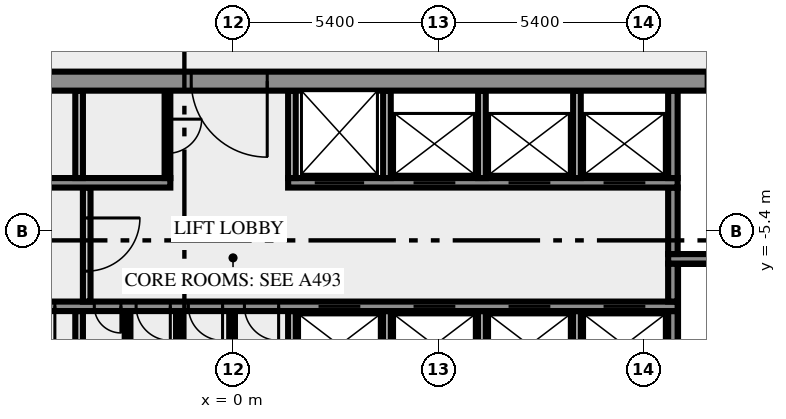
"""IFC4 building model, lengths in metres.
Left out: names, types, materials, properties, quantities, classifications, styles, units other than length and angle.
Written with IfcOpenShell. Run it as: python <this file> out.ifc"""

import sys

from ifc_helpers import new_model, si_unit, direction, frame, frame_2d, origin, place, context, subcontext, project, spatial, rectangle, extrude, element, fill, save


model = new_model("IFC4")
c1 = context("Model", 3, precision=1e-05, world=origin(), true_north=direction((0.0, 1.0)))
c2 = subcontext(c1, "Body", "Model", "MODEL_VIEW")
j1 = project(units=[si_unit("LENGTHUNIT", "METRE"), si_unit("PLANEANGLEUNIT", "RADIAN")], contexts=[c1])
p1 = place(None, origin())
s1 = spatial("IfcSite", under=j1, at=p1, CompositionType="ELEMENT")
p2 = place(p1, origin())
s2 = spatial("IfcBuilding", under=s1, at=p2, CompositionType="ELEMENT")
p3 = place(p2, frame((0.0, 0.0, 206.0)))
s3 = spatial("IfcBuildingStorey", under=s2, at=p3, CompositionType="ELEMENT", Elevation=206.0)
p4 = place(p3, frame((-4.05, -10.5, 0.0), z_axis=(0.0, 0.0, 1.0), x_axis=(0.0, 1.0, 0.0)))
e1 = element("IfcWall", 1, at=p4, inside=s3, PredefinedType="SOLIDWALL", context=c2, shape_type="SweptSolid", body=[
    extrude(rectangle(XDim=3.0, YDim=0.2, at=frame_2d((1.5, 0.0))), origin(), (0.0, 0.0, 1.0), 3.65),
])
for number, where, z_axis, x_axis in (
    (2, (-2.775, -10.5, 0.0), (0.0, 0.0, 1.0), (0.0, 1.0, 0.0)),
    (3, (-1.425, -10.5, 0.0), (0.0, 0.0, 1.0), (0.0, 1.0, 0.0)),
    (4, (-0.025, -10.5, 0.0), (0.0, 0.0, 1.0), (0.0, 1.0, 0.0)),
):
    element("IfcWall", number, at=place(p3, frame(where, z_axis=z_axis, x_axis=x_axis)), inside=s3, PredefinedType="PARTITIONING", context=c2, shape_type="SweptSolid", body=[
        extrude(rectangle(XDim=3.0, YDim=0.15, at=frame_2d((1.5, 0.0))), origin(), (0.0, 0.0, 1.0), 3.65),
    ])
for number, where, z_axis, x_axis in (
    (5, (1.55, -10.5, 0.0), (0.0, 0.0, 1.0), (0.0, 1.0, 0.0)),
    (6, (4.05, -10.5, 0.0), (0.0, 0.0, 1.0), (0.0, 1.0, 0.0)),
    (7, (6.55, -10.5, 0.0), (0.0, 0.0, 1.0), (0.0, 1.0, 0.0)),
    (8, (9.05, -10.5, 0.0), (0.0, 0.0, 1.0), (0.0, 1.0, 0.0)),
):
    element("IfcWall", number, at=place(p3, frame(where, z_axis=z_axis, x_axis=x_axis)), inside=s3, PredefinedType="SOLIDWALL", context=c2, shape_type="SweptSolid", body=[
        extrude(rectangle(XDim=3.0, YDim=0.2, at=frame_2d((1.5, 0.0))), origin(), (0.0, 0.0, 1.0), 3.65),
    ])
p5 = place(p3, frame((11.575, -10.5, 0.0), z_axis=(0.0, 0.0, 1.0), x_axis=(0.0, 1.0, 0.0)))
e9 = element("IfcWall", 9, at=p5, inside=s3, PredefinedType="SHEAR", context=c2, shape_type="SweptSolid", body=[
    extrude(rectangle(XDim=3.0, YDim=0.25, at=frame_2d((1.5, 0.0))), origin(), (0.0, 0.0, 1.0), 3.65),
])
p6 = place(p3, frame((11.7, -7.375, 0.0), z_axis=(0.0, 0.0, 1.0), x_axis=(-1.0, 0.0, 0.0)))
e10 = element("IfcWall", 10, at=p6, inside=s3, PredefinedType="SHEAR", context=c2, shape_type="SweptSolid", body=[
    extrude(rectangle(XDim=23.4, YDim=0.25, at=frame_2d((11.7, 0.0))), origin(), (0.0, 0.0, 1.0), 3.65),
])
p7 = place(p6, frame((21.312, 0.0, 0.0)))
e11 = element("IfcOpeningElement", 11, at=p7, cuts=e10, PredefinedType="OPENING", context=c2, shape_type="SweptSolid", body=[
    extrude(rectangle(XDim=0.9, YDim=2.1, at=frame_2d((0.45, 1.05))), frame((0.0, 0.135, 0.0), z_axis=(0.0, -1.0, 0.0), x_axis=(1.0, 0.0, 0.0)), (0.0, 0.0, 1.0), 0.27),
])
p8 = place(p6, frame((18.65, 0.0, 0.0)))
e12 = element("IfcOpeningElement", 12, at=p8, cuts=e10, PredefinedType="OPENING", context=c2, shape_type="SweptSolid", body=[
    extrude(rectangle(XDim=0.9, YDim=2.1, at=frame_2d((0.45, 1.05))), frame((0.0, 0.135, 0.0), z_axis=(0.0, -1.0, 0.0), x_axis=(1.0, 0.0, 0.0)), (0.0, 0.0, 1.0), 0.27),
])
p9 = place(p6, frame((16.388, 0.0, 0.0)))
e13 = element("IfcOpeningElement", 13, at=p9, cuts=e10, PredefinedType="OPENING", context=c2, shape_type="SweptSolid", body=[
    extrude(rectangle(XDim=0.9, YDim=2.1, at=frame_2d((0.45, 1.05))), frame((0.0, 0.135, 0.0), z_axis=(0.0, -1.0, 0.0), x_axis=(1.0, 0.0, 0.0)), (0.0, 0.0, 1.0), 0.27),
])
p10 = place(p6, frame((14.65, 0.0, 0.0)))
e14 = element("IfcOpeningElement", 14, at=p10, cuts=e10, PredefinedType="OPENING", context=c2, shape_type="SweptSolid", body=[
    extrude(rectangle(XDim=0.7, YDim=2.1, at=frame_2d((0.35, 1.05))), frame((0.0, 0.135, 0.0), z_axis=(0.0, -1.0, 0.0), x_axis=(1.0, 0.0, 0.0)), (0.0, 0.0, 1.0), 0.27),
])
p11 = place(p6, frame((13.35, 0.0, 0.0)))
e15 = element("IfcOpeningElement", 15, at=p11, cuts=e10, PredefinedType="OPENING", context=c2, shape_type="SweptSolid", body=[
    extrude(rectangle(XDim=0.9, YDim=2.1, at=frame_2d((0.45, 1.05))), frame((0.0, 0.135, 0.0), z_axis=(0.0, -1.0, 0.0), x_axis=(1.0, 0.0, 0.0)), (0.0, 0.0, 1.0), 0.27),
])
p12 = place(p6, frame((11.975, 0.0, 0.0)))
e16 = element("IfcOpeningElement", 16, at=p12, cuts=e10, PredefinedType="OPENING", context=c2, shape_type="SweptSolid", body=[
    extrude(rectangle(XDim=0.9, YDim=2.1, at=frame_2d((0.45, 1.05))), frame((0.0, 0.135, 0.0), z_axis=(0.0, -1.0, 0.0), x_axis=(1.0, 0.0, 0.0)), (0.0, 0.0, 1.0), 0.27),
])
p13 = place(p6, frame((10.5, 0.0, 0.0)))
e17 = element("IfcOpeningElement", 17, at=p13, cuts=e10, PredefinedType="OPENING", context=c2, shape_type="SweptSolid", body=[
    extrude(rectangle(XDim=0.9, YDim=2.1, at=frame_2d((0.45, 1.05))), frame((0.0, 0.135, 0.0), z_axis=(0.0, -1.0, 0.0), x_axis=(1.0, 0.0, 0.0)), (0.0, 0.0, 1.0), 0.27),
])
p14 = place(p6, frame((8.35, 0.0, 0.0)))
e18 = element("IfcOpeningElement", 18, at=p14, cuts=e10, PredefinedType="OPENING", context=c2, shape_type="SweptSolid", body=[
    extrude(rectangle(XDim=1.1, YDim=2.1, at=frame_2d((0.55, 1.05))), frame((0.0, 0.135, 0.0), z_axis=(0.0, -1.0, 0.0), x_axis=(1.0, 0.0, 0.0)), (0.0, 0.0, 1.0), 0.27),
])
p15 = place(p6, frame((5.85, 0.0, 0.0)))
e19 = element("IfcOpeningElement", 19, at=p15, cuts=e10, PredefinedType="OPENING", context=c2, shape_type="SweptSolid", body=[
    extrude(rectangle(XDim=1.1, YDim=2.1, at=frame_2d((0.55, 1.05))), frame((0.0, 0.135, 0.0), z_axis=(0.0, -1.0, 0.0), x_axis=(1.0, 0.0, 0.0)), (0.0, 0.0, 1.0), 0.27),
])
p16 = place(p6, frame((3.35, 0.0, 0.0)))
e20 = element("IfcOpeningElement", 20, at=p16, cuts=e10, PredefinedType="OPENING", context=c2, shape_type="SweptSolid", body=[
    extrude(rectangle(XDim=1.1, YDim=2.1, at=frame_2d((0.55, 1.05))), frame((0.0, 0.135, 0.0), z_axis=(0.0, -1.0, 0.0), x_axis=(1.0, 0.0, 0.0)), (0.0, 0.0, 1.0), 0.27),
])
p17 = place(p6, frame((0.85, 0.0, 0.0)))
e21 = element("IfcOpeningElement", 21, at=p17, cuts=e10, PredefinedType="OPENING", context=c2, shape_type="SweptSolid", body=[
    extrude(rectangle(XDim=1.1, YDim=2.1, at=frame_2d((0.55, 1.05))), frame((0.0, 0.135, 0.0), z_axis=(0.0, -1.0, 0.0), x_axis=(1.0, 0.0, 0.0)), (0.0, 0.0, 1.0), 0.27),
])
p18 = place(p3, frame((-3.85, -4.25, 0.0), z_axis=(0.0, 0.0, 1.0), x_axis=(0.0, -1.0, 0.0)))
e22 = element("IfcWall", 22, at=p18, inside=s3, PredefinedType="SOLIDWALL", context=c2, shape_type="SweptSolid", body=[
    extrude(rectangle(XDim=3.0, YDim=0.2, at=frame_2d((1.5, 0.0))), origin(), (0.0, 0.0, 1.0), 3.65),
])
p19 = place(p18, frame((0.8, 0.0, 0.0)))
e23 = element("IfcOpeningElement", 23, at=p19, cuts=e22, PredefinedType="OPENING", context=c2, shape_type="SweptSolid", body=[
    extrude(rectangle(XDim=1.4, YDim=2.1, at=frame_2d((0.7, 1.05))), frame((0.0, 0.11, 0.0), z_axis=(0.0, -1.0, 0.0), x_axis=(1.0, 0.0, 0.0)), (0.0, 0.0, 1.0), 0.22),
])
p20 = place(p3, frame((11.575, -7.25, 0.0), z_axis=(0.0, 0.0, 1.0), x_axis=(0.0, 1.0, 0.0)))
e24 = element("IfcWall", 24, at=p20, inside=s3, PredefinedType="SHEAR", context=c2, shape_type="SweptSolid", body=[
    extrude(rectangle(XDim=1.0, YDim=0.25, at=frame_2d((0.5, 0.0))), origin(), (0.0, 0.0, 1.0), 3.65),
])
p21 = place(p3, frame((19.5, -6.125, 0.0), z_axis=(0.0, 0.0, 1.0), x_axis=(-1.0, 0.0, 0.0)))
e25 = element("IfcWall", 25, at=p21, inside=s3, PredefinedType="SHEAR", context=c2, shape_type="SweptSolid", body=[
    extrude(rectangle(XDim=8.05, YDim=0.25, at=frame_2d((4.025, 0.0))), origin(), (0.0, 0.0, 1.0), 3.65),
])
p22 = place(p21, frame((0.05, 0.0, 0.0)))
e26 = element("IfcOpeningElement", 26, at=p22, cuts=e25, PredefinedType="OPENING", context=c2, shape_type="SweptSolid", body=[
    extrude(rectangle(XDim=1.8, YDim=2.1, at=frame_2d((0.9, 1.05))), frame((0.0, 0.135, 0.0), z_axis=(0.0, -1.0, 0.0), x_axis=(1.0, 0.0, 0.0)), (0.0, 0.0, 1.0), 0.27),
])
p23 = place(p3, frame((11.575, -6.0, 0.0), z_axis=(0.0, 0.0, 1.0), x_axis=(0.0, 1.0, 0.0)))
e27 = element("IfcWall", 27, at=p23, inside=s3, PredefinedType="SHEAR", context=c2, shape_type="SweptSolid", body=[
    extrude(rectangle(XDim=1.75, YDim=0.25, at=frame_2d((0.875, 0.0))), origin(), (0.0, 0.0, 1.0), 3.65),
])
p24 = place(p3, frame((-11.7, -4.125, 0.0), z_axis=(0.0, 0.0, 1.0), x_axis=(1.0, 0.0, 0.0)))
e28 = element("IfcWall", 28, at=p24, inside=s3, PredefinedType="SHEAR", context=c2, shape_type="SweptSolid", body=[
    extrude(rectangle(XDim=10.05, YDim=0.25, at=frame_2d((5.025, 0.0))), origin(), (0.0, 0.0, 1.0), 3.65),
])
p25 = place(p3, frame((1.45, -4.125, 0.0), z_axis=(0.0, 0.0, 1.0), x_axis=(1.0, 0.0, 0.0)))
e29 = element("IfcWall", 29, at=p25, inside=s3, PredefinedType="SHEAR", context=c2, shape_type="SweptSolid", body=[
    extrude(rectangle(XDim=10.25, YDim=0.25, at=frame_2d((5.125, 0.0))), origin(), (0.0, 0.0, 1.0), 3.65),
])
p26 = place(p25, frame((0.7, 0.0, 0.0)))
e30 = element("IfcOpeningElement", 30, at=p26, cuts=e29, PredefinedType="OPENING", context=c2, shape_type="SweptSolid", body=[
    extrude(rectangle(XDim=1.3, YDim=2.1, at=frame_2d((0.65, 1.05))), frame((0.0, 0.135, 0.0), z_axis=(0.0, -1.0, 0.0), x_axis=(1.0, 0.0, 0.0)), (0.0, 0.0, 1.0), 0.27),
])
p27 = place(p25, frame((3.3, 0.0, 0.0)))
e31 = element("IfcOpeningElement", 31, at=p27, cuts=e29, PredefinedType="OPENING", context=c2, shape_type="SweptSolid", body=[
    extrude(rectangle(XDim=1.1, YDim=2.1, at=frame_2d((0.55, 1.05))), frame((0.0, 0.135, 0.0), z_axis=(0.0, -1.0, 0.0), x_axis=(1.0, 0.0, 0.0)), (0.0, 0.0, 1.0), 0.27),
])
p28 = place(p25, frame((5.8, 0.0, 0.0)))
e32 = element("IfcOpeningElement", 32, at=p28, cuts=e29, PredefinedType="OPENING", context=c2, shape_type="SweptSolid", body=[
    extrude(rectangle(XDim=1.1, YDim=2.1, at=frame_2d((0.55, 1.05))), frame((0.0, 0.135, 0.0), z_axis=(0.0, -1.0, 0.0), x_axis=(1.0, 0.0, 0.0)), (0.0, 0.0, 1.0), 0.27),
])
p29 = place(p25, frame((8.3, 0.0, 0.0)))
e33 = element("IfcOpeningElement", 33, at=p29, cuts=e29, PredefinedType="OPENING", context=c2, shape_type="SweptSolid", body=[
    extrude(rectangle(XDim=1.1, YDim=2.1, at=frame_2d((0.55, 1.05))), frame((0.0, 0.135, 0.0), z_axis=(0.0, -1.0, 0.0), x_axis=(1.0, 0.0, 0.0)), (0.0, 0.0, 1.0), 0.27),
])
p30 = place(p3, frame((-4.05, -4.0, 0.0), z_axis=(0.0, 0.0, 1.0), x_axis=(0.0, 1.0, 0.0)))
e34 = element("IfcWall", 34, at=p30, inside=s3, PredefinedType="SOLIDWALL", context=c2, shape_type="SweptSolid", body=[
    extrude(rectangle(XDim=2.3, YDim=0.2, at=frame_2d((1.15, 0.0))), origin(), (0.0, 0.0, 1.0), 3.65),
])
p31 = place(p3, frame((-1.725, -1.7, 0.0), z_axis=(0.0, 0.0, 1.0), x_axis=(0.0, -1.0, 0.0)))
e35 = element("IfcWall", 35, at=p31, inside=s3, PredefinedType="PARTITIONING", context=c2, shape_type="SweptSolid", body=[
    extrude(rectangle(XDim=2.3, YDim=0.15, at=frame_2d((1.15, 0.0))), origin(), (0.0, 0.0, 1.0), 3.65),
])
p32 = place(p31, frame((0.75, 0.0, 0.0)))
e36 = element("IfcOpeningElement", 36, at=p32, cuts=e35, PredefinedType="OPENING", context=c2, shape_type="SweptSolid", body=[
    extrude(rectangle(XDim=0.9, YDim=2.1, at=frame_2d((0.45, 1.05))), frame((0.0, 0.085, 0.0), z_axis=(0.0, -1.0, 0.0), x_axis=(1.0, 0.0, 0.0)), (0.0, 0.0, 1.0), 0.17),
])
for number, where, z_axis, x_axis in (
    (37, (1.55, -4.0, 0.0), (0.0, 0.0, 1.0), (0.0, 1.0, 0.0)),
    (38, (4.05, -4.0, 0.0), (0.0, 0.0, 1.0), (0.0, 1.0, 0.0)),
    (39, (6.55, -4.0, 0.0), (0.0, 0.0, 1.0), (0.0, 1.0, 0.0)),
    (40, (9.05, -4.0, 0.0), (0.0, 0.0, 1.0), (0.0, 1.0, 0.0)),
):
    element("IfcWall", number, at=place(p3, frame(where, z_axis=z_axis, x_axis=x_axis)), inside=s3, PredefinedType="SOLIDWALL", context=c2, shape_type="SweptSolid", body=[
        extrude(rectangle(XDim=2.3, YDim=0.2, at=frame_2d((1.15, 0.0))), origin(), (0.0, 0.0, 1.0), 3.65),
    ])
p33 = place(p3, frame((11.575, -4.0, 0.0), z_axis=(0.0, 0.0, 1.0), x_axis=(0.0, 1.0, 0.0)))
e41 = element("IfcWall", 41, at=p33, inside=s3, PredefinedType="SHEAR", context=c2, shape_type="SweptSolid", body=[
    extrude(rectangle(XDim=2.3, YDim=0.25, at=frame_2d((1.15, 0.0))), origin(), (0.0, 0.0, 1.0), 3.65),
])
p34 = place(p3, frame((20.49, -1.45, 0.0), z_axis=(0.0, 0.0, 1.0), x_axis=(-1.0, 0.0, 0.0)))
e42 = element("IfcWall", 42, at=p34, inside=s3, PredefinedType="SHEAR", context=c2, shape_type="SweptSolid", body=[
    extrude(rectangle(XDim=40.98, YDim=0.5, at=frame_2d((20.49, 0.0))), origin(), (0.0, 0.0, 1.0), 3.65),
])
p35 = place(p34, frame((38.14, 0.0, 0.0)))
e43 = element("IfcOpeningElement", 43, at=p35, cuts=e42, PredefinedType="OPENING", context=c2, shape_type="SweptSolid", body=[
    extrude(rectangle(XDim=1.8, YDim=2.1, at=frame_2d((0.9, 1.05))), frame((0.0, 0.26, 0.0), z_axis=(0.0, -1.0, 0.0), x_axis=(1.0, 0.0, 0.0)), (0.0, 0.0, 1.0), 0.52),
])
p36 = place(p34, frame((36.728, 0.0, 0.0)))
e44 = element("IfcOpeningElement", 44, at=p36, cuts=e42, PredefinedType="OPENING", context=c2, shape_type="SweptSolid", body=[
    extrude(rectangle(XDim=0.8, YDim=2.1, at=frame_2d((0.4, 1.05))), frame((0.0, 0.26, 0.0), z_axis=(0.0, -1.0, 0.0), x_axis=(1.0, 0.0, 0.0)), (0.0, 0.0, 1.0), 0.52),
])
p37 = place(p34, frame((35.153, 0.0, 0.0)))
e45 = element("IfcOpeningElement", 45, at=p37, cuts=e42, PredefinedType="OPENING", context=c2, shape_type="SweptSolid", body=[
    extrude(rectangle(XDim=0.8, YDim=2.1, at=frame_2d((0.4, 1.05))), frame((0.0, 0.26, 0.0), z_axis=(0.0, -1.0, 0.0), x_axis=(1.0, 0.0, 0.0)), (0.0, 0.0, 1.0), 0.52),
])
p38 = place(p34, frame((32.94, 0.0, 0.0)))
e46 = element("IfcOpeningElement", 46, at=p38, cuts=e42, PredefinedType="OPENING", context=c2, shape_type="SweptSolid", body=[
    extrude(rectangle(XDim=0.9, YDim=2.1, at=frame_2d((0.45, 1.05))), frame((0.0, 0.26, 0.0), z_axis=(0.0, -1.0, 0.0), x_axis=(1.0, 0.0, 0.0)), (0.0, 0.0, 1.0), 0.52),
])
p39 = place(p34, frame((30.702, 0.0, 0.0)))
e47 = element("IfcOpeningElement", 47, at=p39, cuts=e42, PredefinedType="OPENING", context=c2, shape_type="SweptSolid", body=[
    extrude(rectangle(XDim=0.9, YDim=2.1, at=frame_2d((0.45, 1.05))), frame((0.0, 0.26, 0.0), z_axis=(0.0, -1.0, 0.0), x_axis=(1.0, 0.0, 0.0)), (0.0, 0.0, 1.0), 0.52),
])
p40 = place(p34, frame((28.64, 0.0, 0.0)))
e48 = element("IfcOpeningElement", 48, at=p40, cuts=e42, PredefinedType="OPENING", context=c2, shape_type="SweptSolid", body=[
    extrude(rectangle(XDim=0.9, YDim=2.1, at=frame_2d((0.45, 1.05))), frame((0.0, 0.26, 0.0), z_axis=(0.0, -1.0, 0.0), x_axis=(1.0, 0.0, 0.0)), (0.0, 0.0, 1.0), 0.52),
])
p41 = place(p34, frame((25.778, 0.0, 0.0)))
e49 = element("IfcOpeningElement", 49, at=p41, cuts=e42, PredefinedType="OPENING", context=c2, shape_type="SweptSolid", body=[
    extrude(rectangle(XDim=0.9, YDim=2.1, at=frame_2d((0.45, 1.05))), frame((0.0, 0.26, 0.0), z_axis=(0.0, -1.0, 0.0), x_axis=(1.0, 0.0, 0.0)), (0.0, 0.0, 1.0), 0.52),
])
p42 = place(p34, frame((19.59, 0.0, 0.0)))
e50 = element("IfcOpeningElement", 50, at=p42, cuts=e42, PredefinedType="OPENING", context=c2, shape_type="SweptSolid", body=[
    extrude(rectangle(XDim=2.0, YDim=2.1, at=frame_2d((1.0, 1.05))), frame((0.0, 0.26, 0.0), z_axis=(0.0, -1.0, 0.0), x_axis=(1.0, 0.0, 0.0)), (0.0, 0.0, 1.0), 0.52),
])
p43 = place(p34, frame((7.14, 0.0, 0.0)))
e51 = element("IfcOpeningElement", 51, at=p43, cuts=e42, PredefinedType="OPENING", context=c2, shape_type="SweptSolid", body=[
    extrude(rectangle(XDim=0.9, YDim=2.1, at=frame_2d((0.45, 1.05))), frame((0.0, 0.26, 0.0), z_axis=(0.0, -1.0, 0.0), x_axis=(1.0, 0.0, 0.0)), (0.0, 0.0, 1.0), 0.52),
])
p44 = place(p34, frame((4.19, 0.0, 0.0)))
e52 = element("IfcOpeningElement", 52, at=p44, cuts=e42, PredefinedType="OPENING", context=c2, shape_type="SweptSolid", body=[
    extrude(rectangle(XDim=0.9, YDim=2.1, at=frame_2d((0.45, 1.05))), frame((0.0, 0.26, 0.0), z_axis=(0.0, -1.0, 0.0), x_axis=(1.0, 0.0, 0.0)), (0.0, 0.0, 1.0), 0.52),
])
p45 = place(p34, frame((1.04, 0.0, 0.0)))
e53 = element("IfcOpeningElement", 53, at=p45, cuts=e42, PredefinedType="OPENING", context=c2, shape_type="SweptSolid", body=[
    extrude(rectangle(XDim=1.8, YDim=2.1, at=frame_2d((0.9, 1.05))), frame((0.0, 0.26, 0.0), z_axis=(0.0, -1.0, 0.0), x_axis=(1.0, 0.0, 0.0)), (0.0, 0.0, 1.0), 0.52),
])
p46 = place(p9, origin())
e54 = element("IfcDoor", 54, at=p46, inside=s3, OperationType="SINGLE_SWING_RIGHT", PredefinedType="DOOR", context=c2, shape_type="SweptSolid", body=[
    extrude(rectangle(XDim=0.9, YDim=2.1, at=frame_2d((0.45, 1.05))), frame((0.0, 0.025, 0.0), z_axis=(0.0, -1.0, 0.0), x_axis=(1.0, 0.0, 0.0)), (0.0, 0.0, 1.0), 0.05),
])
fill(e13, e54)
p47 = place(p10, origin())
e55 = element("IfcDoor", 55, at=p47, inside=s3, OperationType="SINGLE_SWING_RIGHT", PredefinedType="DOOR", context=c2, shape_type="SweptSolid", body=[
    extrude(rectangle(XDim=0.7, YDim=2.1, at=frame_2d((0.35, 1.05))), frame((0.0, 0.025, 0.0), z_axis=(0.0, -1.0, 0.0), x_axis=(1.0, 0.0, 0.0)), (0.0, 0.0, 1.0), 0.05),
])
fill(e14, e55)
p48 = place(p11, origin())
e56 = element("IfcDoor", 56, at=p48, inside=s3, OperationType="SINGLE_SWING_RIGHT", PredefinedType="DOOR", context=c2, shape_type="SweptSolid", body=[
    extrude(rectangle(XDim=0.9, YDim=2.1, at=frame_2d((0.45, 1.05))), frame((0.0, 0.025, 0.0), z_axis=(0.0, -1.0, 0.0), x_axis=(1.0, 0.0, 0.0)), (0.0, 0.0, 1.0), 0.05),
])
fill(e15, e56)
p49 = place(p12, origin())
e57 = element("IfcDoor", 57, at=p49, inside=s3, OperationType="SINGLE_SWING_RIGHT", PredefinedType="DOOR", context=c2, shape_type="SweptSolid", body=[
    extrude(rectangle(XDim=0.9, YDim=2.1, at=frame_2d((0.45, 1.05))), frame((0.0, 0.025, 0.0), z_axis=(0.0, -1.0, 0.0), x_axis=(1.0, 0.0, 0.0)), (0.0, 0.0, 1.0), 0.05),
])
fill(e16, e57)
p50 = place(p13, origin())
e58 = element("IfcDoor", 58, at=p50, inside=s3, OperationType="SINGLE_SWING_LEFT", PredefinedType="DOOR", context=c2, shape_type="SweptSolid", body=[
    extrude(rectangle(XDim=0.9, YDim=2.1, at=frame_2d((0.45, 1.05))), frame((0.0, 0.025, 0.0), z_axis=(0.0, -1.0, 0.0), x_axis=(1.0, 0.0, 0.0)), (0.0, 0.0, 1.0), 0.05),
])
fill(e17, e58)
p51 = place(p14, origin())
e59 = element("IfcDoor", 59, at=p51, inside=s3, OperationType="DOUBLE_DOOR_SLIDING", PredefinedType="DOOR", context=c2, shape_type="SweptSolid", body=[
    extrude(rectangle(XDim=1.1, YDim=2.1, at=frame_2d((0.55, 1.05))), frame((0.0, 0.025, 0.0), z_axis=(0.0, -1.0, 0.0), x_axis=(1.0, 0.0, 0.0)), (0.0, 0.0, 1.0), 0.05),
])
fill(e18, e59)
p52 = place(p15, origin())
e60 = element("IfcDoor", 60, at=p52, inside=s3, OperationType="DOUBLE_DOOR_SLIDING", PredefinedType="DOOR", context=c2, shape_type="SweptSolid", body=[
    extrude(rectangle(XDim=1.1, YDim=2.1, at=frame_2d((0.55, 1.05))), frame((0.0, 0.025, 0.0), z_axis=(0.0, -1.0, 0.0), x_axis=(1.0, 0.0, 0.0)), (0.0, 0.0, 1.0), 0.05),
])
fill(e19, e60)
p53 = place(p16, origin())
e61 = element("IfcDoor", 61, at=p53, inside=s3, OperationType="DOUBLE_DOOR_SLIDING", PredefinedType="DOOR", context=c2, shape_type="SweptSolid", body=[
    extrude(rectangle(XDim=1.1, YDim=2.1, at=frame_2d((0.55, 1.05))), frame((0.0, 0.025, 0.0), z_axis=(0.0, -1.0, 0.0), x_axis=(1.0, 0.0, 0.0)), (0.0, 0.0, 1.0), 0.05),
])
fill(e20, e61)
p54 = place(p17, origin())
e62 = element("IfcDoor", 62, at=p54, inside=s3, OperationType="DOUBLE_DOOR_SLIDING", PredefinedType="DOOR", context=c2, shape_type="SweptSolid", body=[
    extrude(rectangle(XDim=1.1, YDim=2.1, at=frame_2d((0.55, 1.05))), frame((0.0, 0.025, 0.0), z_axis=(0.0, -1.0, 0.0), x_axis=(1.0, 0.0, 0.0)), (0.0, 0.0, 1.0), 0.05),
])
fill(e21, e62)
p55 = place(p19, origin())
e63 = element("IfcDoor", 63, at=p55, inside=s3, OperationType="DOUBLE_DOOR_SINGLE_SWING", PredefinedType="DOOR", context=c2, shape_type="SweptSolid", body=[
    extrude(rectangle(XDim=1.4, YDim=2.1, at=frame_2d((0.7, 1.05))), frame((0.0, 0.025, 0.0), z_axis=(0.0, -1.0, 0.0), x_axis=(1.0, 0.0, 0.0)), (0.0, 0.0, 1.0), 0.05),
])
fill(e23, e63)
p56 = place(p26, origin())
e64 = element("IfcDoor", 64, at=p56, inside=s3, OperationType="DOUBLE_DOOR_SLIDING", PredefinedType="DOOR", context=c2, shape_type="SweptSolid", body=[
    extrude(rectangle(XDim=1.3, YDim=2.1, at=frame_2d((0.65, 1.05))), frame((0.0, 0.025, 0.0), z_axis=(0.0, -1.0, 0.0), x_axis=(1.0, 0.0, 0.0)), (0.0, 0.0, 1.0), 0.05),
])
fill(e30, e64)
p57 = place(p27, origin())
e65 = element("IfcDoor", 65, at=p57, inside=s3, OperationType="DOUBLE_DOOR_SLIDING", PredefinedType="DOOR", context=c2, shape_type="SweptSolid", body=[
    extrude(rectangle(XDim=1.1, YDim=2.1, at=frame_2d((0.55, 1.05))), frame((0.0, 0.025, 0.0), z_axis=(0.0, -1.0, 0.0), x_axis=(1.0, 0.0, 0.0)), (0.0, 0.0, 1.0), 0.05),
])
fill(e31, e65)
p58 = place(p28, origin())
e66 = element("IfcDoor", 66, at=p58, inside=s3, OperationType="DOUBLE_DOOR_SLIDING", PredefinedType="DOOR", context=c2, shape_type="SweptSolid", body=[
    extrude(rectangle(XDim=1.1, YDim=2.1, at=frame_2d((0.55, 1.05))), frame((0.0, 0.025, 0.0), z_axis=(0.0, -1.0, 0.0), x_axis=(1.0, 0.0, 0.0)), (0.0, 0.0, 1.0), 0.05),
])
fill(e32, e66)
p59 = place(p29, origin())
e67 = element("IfcDoor", 67, at=p59, inside=s3, OperationType="DOUBLE_DOOR_SLIDING", PredefinedType="DOOR", context=c2, shape_type="SweptSolid", body=[
    extrude(rectangle(XDim=1.1, YDim=2.1, at=frame_2d((0.55, 1.05))), frame((0.0, 0.025, 0.0), z_axis=(0.0, -1.0, 0.0), x_axis=(1.0, 0.0, 0.0)), (0.0, 0.0, 1.0), 0.05),
])
fill(e33, e67)
p60 = place(p32, origin())
e68 = element("IfcDoor", 68, at=p60, inside=s3, OperationType="SINGLE_SWING_RIGHT", PredefinedType="DOOR", context=c2, shape_type="SweptSolid", body=[
    extrude(rectangle(XDim=0.9, YDim=2.1, at=frame_2d((0.45, 1.05))), frame((0.0, 0.025, 0.0), z_axis=(0.0, -1.0, 0.0), x_axis=(1.0, 0.0, 0.0)), (0.0, 0.0, 1.0), 0.05),
])
fill(e36, e68)
p61 = place(p42, origin())
e69 = element("IfcDoor", 69, at=p61, inside=s3, OperationType="DOUBLE_DOOR_SINGLE_SWING", PredefinedType="DOOR", context=c2, shape_type="SweptSolid", body=[
    extrude(rectangle(XDim=2.0, YDim=2.1, at=frame_2d((1.0, 1.05))), frame((0.0, 0.025, 0.0), z_axis=(0.0, -1.0, 0.0), x_axis=(1.0, 0.0, 0.0)), (0.0, 0.0, 1.0), 0.05),
])
fill(e50, e69)
save(model, sys.argv[1])
